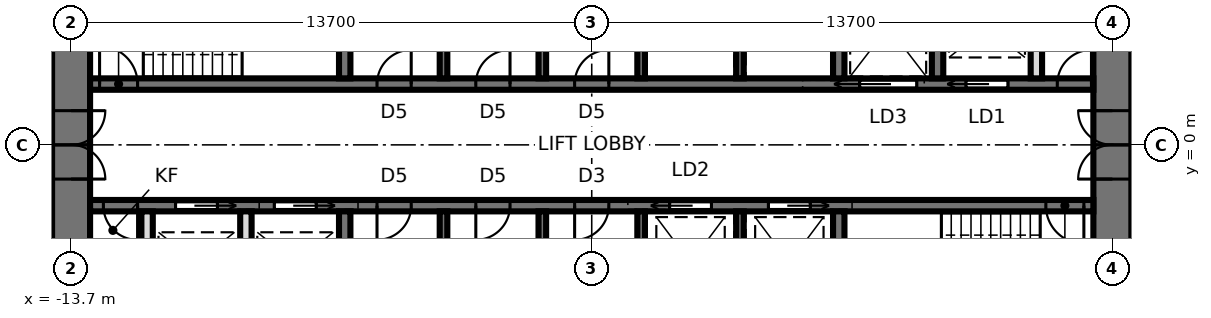
"""IFC4 building model, lengths in metres.
Left out: names, types, materials, properties, quantities, classifications, styles, units other than length and angle.
Written with IfcOpenShell. Run it as: python <this file> out.ifc"""

import sys

from ifc_helpers import new_model, si_unit, direction, frame, frame_2d, origin, place, context, subcontext, project, spatial, rectangle, extrude, element, fill, save


model = new_model("IFC4")
c1 = context("Model", 3, precision=1e-05, world=origin(), true_north=direction((0.0, 1.0)))
c2 = subcontext(c1, "Body", "Model", "MODEL_VIEW")
j1 = project(units=[si_unit("LENGTHUNIT", "METRE"), si_unit("PLANEANGLEUNIT", "RADIAN")], contexts=[c1])
p1 = place(None, origin())
s1 = spatial("IfcSite", under=j1, at=p1, CompositionType="ELEMENT")
p2 = place(p1, origin())
s2 = spatial("IfcBuilding", under=s1, at=p2, CompositionType="ELEMENT")
p3 = place(p2, frame((0.0, 0.0, 234.5)))
s3 = spatial("IfcBuildingStorey", under=s2, at=p3, CompositionType="ELEMENT", Elevation=234.5)
p4 = place(p3, frame((13.7, -9.5, 0.0), z_axis=(0.0, 0.0, 1.0), x_axis=(0.0, 1.0, 0.0)))
e1 = element("IfcWall", 1, at=p4, inside=s3, PredefinedType="SHEAR", context=c2, shape_type="SweptSolid", body=[
    extrude(rectangle(XDim=19.0, YDim=1.0, at=frame_2d((9.5, 0.0))), origin(), (0.0, 0.0, 1.0), 3.9),
])
p5 = place(p4, frame((8.6, 0.0, 0.0)))
e2 = element("IfcOpeningElement", 2, at=p5, cuts=e1, PredefinedType="OPENING", context=c2, shape_type="SweptSolid", body=[
    extrude(rectangle(XDim=1.8, YDim=2.4, at=frame_2d((0.9, 1.2))), frame((0.0, 0.51, 0.0), z_axis=(0.0, -1.0, 0.0), x_axis=(1.0, 0.0, 0.0)), (0.0, 0.0, 1.0), 1.02),
])
p6 = place(p3, frame((-13.7, 9.5, 0.0), z_axis=(0.0, 0.0, 1.0), x_axis=(0.0, -1.0, 0.0)))
e3 = element("IfcWall", 3, at=p6, inside=s3, PredefinedType="SHEAR", context=c2, shape_type="SweptSolid", body=[
    extrude(rectangle(XDim=19.0, YDim=1.0, at=frame_2d((9.5, 0.0))), origin(), (0.0, 0.0, 1.0), 3.9),
])
p7 = place(p6, frame((8.6, 0.0, 0.0)))
e4 = element("IfcOpeningElement", 4, at=p7, cuts=e3, PredefinedType="OPENING", context=c2, shape_type="SweptSolid", body=[
    extrude(rectangle(XDim=1.8, YDim=2.4, at=frame_2d((0.9, 1.2))), frame((0.0, 0.51, 0.0), z_axis=(0.0, -1.0, 0.0), x_axis=(1.0, 0.0, 0.0)), (0.0, 0.0, 1.0), 1.02),
])
p8 = place(p3, frame((-13.2, 1.6, 0.0), z_axis=(0.0, 0.0, 1.0), x_axis=(1.0, 0.0, 0.0)))
e5 = element("IfcWall", 5, at=p8, inside=s3, PredefinedType="SHEAR", context=c2, shape_type="SweptSolid", body=[
    extrude(rectangle(XDim=26.4, YDim=0.3, at=frame_2d((13.2, 0.0))), origin(), (0.0, 0.0, 1.0), 3.9),
])
p9 = place(p8, frame((0.25, 0.0, 0.0)))
e6 = element("IfcOpeningElement", 6, at=p9, cuts=e5, PredefinedType="OPENING", context=c2, shape_type="SweptSolid", body=[
    extrude(rectangle(XDim=1.0, YDim=2.1, at=frame_2d((0.5, 1.05))), frame((0.0, 0.16, 0.0), z_axis=(0.0, -1.0, 0.0), x_axis=(1.0, 0.0, 0.0)), (0.0, 0.0, 1.0), 0.32),
])
p10 = place(p8, frame((23.05, 0.0, 0.0)))
e7 = element("IfcOpeningElement", 7, at=p10, cuts=e5, PredefinedType="OPENING", context=c2, shape_type="SweptSolid", body=[
    extrude(rectangle(XDim=1.1, YDim=2.3, at=frame_2d((0.55, 1.15))), frame((0.0, 0.16, 0.0), z_axis=(0.0, -1.0, 0.0), x_axis=(1.0, 0.0, 0.0)), (0.0, 0.0, 1.0), 0.32),
])
p11 = place(p8, frame((20.25, 0.0, 0.0)))
e8 = element("IfcOpeningElement", 8, at=p11, cuts=e5, PredefinedType="OPENING", context=c2, shape_type="SweptSolid", body=[
    extrude(rectangle(XDim=1.5, YDim=2.4, at=frame_2d((0.75, 1.2))), frame((0.0, 0.16, 0.0), z_axis=(0.0, -1.0, 0.0), x_axis=(1.0, 0.0, 0.0)), (0.0, 0.0, 1.0), 0.32),
])
p12 = place(p8, frame((7.55, 0.0, 0.0)))
e9 = element("IfcOpeningElement", 9, at=p12, cuts=e5, PredefinedType="OPENING", context=c2, shape_type="SweptSolid", body=[
    extrude(rectangle(XDim=0.9, YDim=2.1, at=frame_2d((0.45, 1.05))), frame((0.0, 0.16, 0.0), z_axis=(0.0, -1.0, 0.0), x_axis=(1.0, 0.0, 0.0)), (0.0, 0.0, 1.0), 0.32),
])
p13 = place(p8, frame((10.15, 0.0, 0.0)))
e10 = element("IfcOpeningElement", 10, at=p13, cuts=e5, PredefinedType="OPENING", context=c2, shape_type="SweptSolid", body=[
    extrude(rectangle(XDim=0.9, YDim=2.1, at=frame_2d((0.45, 1.05))), frame((0.0, 0.16, 0.0), z_axis=(0.0, -1.0, 0.0), x_axis=(1.0, 0.0, 0.0)), (0.0, 0.0, 1.0), 0.32),
])
p14 = place(p8, frame((12.75, 0.0, 0.0)))
e11 = element("IfcOpeningElement", 11, at=p14, cuts=e5, PredefinedType="OPENING", context=c2, shape_type="SweptSolid", body=[
    extrude(rectangle(XDim=0.9, YDim=2.1, at=frame_2d((0.45, 1.05))), frame((0.0, 0.16, 0.0), z_axis=(0.0, -1.0, 0.0), x_axis=(1.0, 0.0, 0.0)), (0.0, 0.0, 1.0), 0.32),
])
p15 = place(p8, frame((25.45, 0.0, 0.0)))
e12 = element("IfcOpeningElement", 12, at=p15, cuts=e5, PredefinedType="OPENING", context=c2, shape_type="SweptSolid", body=[
    extrude(rectangle(XDim=0.9, YDim=2.1, at=frame_2d((0.45, 1.05))), frame((0.0, 0.16, 0.0), z_axis=(0.0, -1.0, 0.0), x_axis=(1.0, 0.0, 0.0)), (0.0, 0.0, 1.0), 0.32),
])
p16 = place(p3, frame((-13.2, -1.6, 0.0), z_axis=(0.0, 0.0, 1.0), x_axis=(1.0, 0.0, 0.0)))
e13 = element("IfcWall", 13, at=p16, inside=s3, PredefinedType="SHEAR", context=c2, shape_type="SweptSolid", body=[
    extrude(rectangle(XDim=26.4, YDim=0.3, at=frame_2d((13.2, 0.0))), origin(), (0.0, 0.0, 1.0), 3.9),
])
p17 = place(p16, frame((25.15, 0.0, 0.0)))
e14 = element("IfcOpeningElement", 14, at=p17, cuts=e13, PredefinedType="OPENING", context=c2, shape_type="SweptSolid", body=[
    extrude(rectangle(XDim=1.0, YDim=2.1, at=frame_2d((0.5, 1.05))), frame((0.0, 0.16, 0.0), z_axis=(0.0, -1.0, 0.0), x_axis=(1.0, 0.0, 0.0)), (0.0, 0.0, 1.0), 0.32),
])
p18 = place(p16, frame((7.55, 0.0, 0.0)))
e15 = element("IfcOpeningElement", 15, at=p18, cuts=e13, PredefinedType="OPENING", context=c2, shape_type="SweptSolid", body=[
    extrude(rectangle(XDim=0.9, YDim=2.1, at=frame_2d((0.45, 1.05))), frame((0.0, 0.16, 0.0), z_axis=(0.0, -1.0, 0.0), x_axis=(1.0, 0.0, 0.0)), (0.0, 0.0, 1.0), 0.32),
])
p19 = place(p16, frame((10.15, 0.0, 0.0)))
e16 = element("IfcOpeningElement", 16, at=p19, cuts=e13, PredefinedType="OPENING", context=c2, shape_type="SweptSolid", body=[
    extrude(rectangle(XDim=0.9, YDim=2.1, at=frame_2d((0.45, 1.05))), frame((0.0, 0.16, 0.0), z_axis=(0.0, -1.0, 0.0), x_axis=(1.0, 0.0, 0.0)), (0.0, 0.0, 1.0), 0.32),
])
p20 = place(p16, frame((12.75, 0.0, 0.0)))
e17 = element("IfcOpeningElement", 17, at=p20, cuts=e13, PredefinedType="OPENING", context=c2, shape_type="SweptSolid", body=[
    extrude(rectangle(XDim=0.9, YDim=2.1, at=frame_2d((0.45, 1.05))), frame((0.0, 0.16, 0.0), z_axis=(0.0, -1.0, 0.0), x_axis=(1.0, 0.0, 0.0)), (0.0, 0.0, 1.0), 0.32),
])
p21 = place(p16, frame((15.25, 0.0, 0.0)))
e18 = element("IfcOpeningElement", 18, at=p21, cuts=e13, PredefinedType="OPENING", context=c2, shape_type="SweptSolid", body=[
    extrude(rectangle(XDim=1.1, YDim=2.3, at=frame_2d((0.55, 1.15))), frame((0.0, 0.16, 0.0), z_axis=(0.0, -1.0, 0.0), x_axis=(1.0, 0.0, 0.0)), (0.0, 0.0, 1.0), 0.32),
])
p22 = place(p16, frame((17.85, 0.0, 0.0)))
e19 = element("IfcOpeningElement", 19, at=p22, cuts=e13, PredefinedType="OPENING", context=c2, shape_type="SweptSolid", body=[
    extrude(rectangle(XDim=1.1, YDim=2.3, at=frame_2d((0.55, 1.15))), frame((0.0, 0.16, 0.0), z_axis=(0.0, -1.0, 0.0), x_axis=(1.0, 0.0, 0.0)), (0.0, 0.0, 1.0), 0.32),
])
p23 = place(p16, frame((4.85, 0.0, 0.0)))
e20 = element("IfcOpeningElement", 20, at=p23, cuts=e13, PredefinedType="OPENING", context=c2, shape_type="SweptSolid", body=[
    extrude(rectangle(XDim=1.1, YDim=2.3, at=frame_2d((0.55, 1.15))), frame((0.0, 0.16, 0.0), z_axis=(0.0, -1.0, 0.0), x_axis=(1.0, 0.0, 0.0)), (0.0, 0.0, 1.0), 0.32),
])
p24 = place(p16, frame((2.25, 0.0, 0.0)))
e21 = element("IfcOpeningElement", 21, at=p24, cuts=e13, PredefinedType="OPENING", context=c2, shape_type="SweptSolid", body=[
    extrude(rectangle(XDim=1.1, YDim=2.3, at=frame_2d((0.55, 1.15))), frame((0.0, 0.16, 0.0), z_axis=(0.0, -1.0, 0.0), x_axis=(1.0, 0.0, 0.0)), (0.0, 0.0, 1.0), 0.32),
])
p25 = place(p16, frame((0.35, 0.0, 0.0)))
e22 = element("IfcOpeningElement", 22, at=p25, cuts=e13, PredefinedType="OPENING", context=c2, shape_type="SweptSolid", body=[
    extrude(rectangle(XDim=0.9, YDim=2.1, at=frame_2d((0.45, 1.05))), frame((0.0, 0.16, 0.0), z_axis=(0.0, -1.0, 0.0), x_axis=(1.0, 0.0, 0.0)), (0.0, 0.0, 1.0), 0.32),
])
for number, where, z_axis, x_axis in (
    (23, (-6.5, 1.75, 0.0), (0.0, 0.0, 1.0), (0.0, 1.0, 0.0)),
    (24, (6.5, 1.75, 0.0), (0.0, 0.0, 1.0), (0.0, 1.0, 0.0)),
):
    element("IfcWall", number, at=place(p3, frame(where, z_axis=z_axis, x_axis=x_axis)), inside=s3, PredefinedType="SHEAR", context=c2, shape_type="SweptSolid", body=[
        extrude(rectangle(XDim=2.7, YDim=0.3, at=frame_2d((1.35, 0.0))), origin(), (0.0, 0.0, 1.0), 3.9),
    ])
for number, where, z_axis, x_axis in (
    (25, (-3.9, 1.75, 0.0), (0.0, 0.0, 1.0), (0.0, 1.0, 0.0)),
    (26, (-1.3, 1.75, 0.0), (0.0, 0.0, 1.0), (0.0, 1.0, 0.0)),
    (27, (1.3, 1.75, 0.0), (0.0, 0.0, 1.0), (0.0, 1.0, 0.0)),
    (28, (3.9, 1.75, 0.0), (0.0, 0.0, 1.0), (0.0, 1.0, 0.0)),
):
    element("IfcWall", number, at=place(p3, frame(where, z_axis=z_axis, x_axis=x_axis)), inside=s3, PredefinedType="SHEAR", context=c2, shape_type="SweptSolid", body=[
        extrude(rectangle(XDim=2.7, YDim=0.2, at=frame_2d((1.35, 0.0))), origin(), (0.0, 0.0, 1.0), 3.9),
    ])
for number, where, z_axis, x_axis in (
    (29, (-6.5, -1.75, 0.0), (0.0, 0.0, 1.0), (0.0, -1.0, 0.0)),
    (30, (6.5, -1.75, 0.0), (0.0, 0.0, 1.0), (0.0, -1.0, 0.0)),
):
    element("IfcWall", number, at=place(p3, frame(where, z_axis=z_axis, x_axis=x_axis)), inside=s3, PredefinedType="SHEAR", context=c2, shape_type="SweptSolid", body=[
        extrude(rectangle(XDim=2.7, YDim=0.3, at=frame_2d((1.35, 0.0))), origin(), (0.0, 0.0, 1.0), 3.9),
    ])
for number, where, z_axis, x_axis in (
    (31, (-3.9, -1.75, 0.0), (0.0, 0.0, 1.0), (0.0, -1.0, 0.0)),
    (32, (-1.3, -1.75, 0.0), (0.0, 0.0, 1.0), (0.0, -1.0, 0.0)),
    (33, (1.3, -1.75, 0.0), (0.0, 0.0, 1.0), (0.0, -1.0, 0.0)),
    (34, (3.9, -1.75, 0.0), (0.0, 0.0, 1.0), (0.0, -1.0, 0.0)),
):
    element("IfcWall", number, at=place(p3, frame(where, z_axis=z_axis, x_axis=x_axis)), inside=s3, PredefinedType="SHEAR", context=c2, shape_type="SweptSolid", body=[
        extrude(rectangle(XDim=2.7, YDim=0.2, at=frame_2d((1.35, 0.0))), origin(), (0.0, 0.0, 1.0), 3.9),
    ])
p26 = place(p3, frame((9.1, 1.75, 0.0), z_axis=(0.0, 0.0, 1.0), x_axis=(0.0, 1.0, 0.0)))
e35 = element("IfcWall", 35, at=p26, inside=s3, PredefinedType="SHEAR", context=c2, shape_type="SweptSolid", body=[
    extrude(rectangle(XDim=2.7, YDim=0.3, at=frame_2d((1.35, 0.0))), origin(), (0.0, 0.0, 1.0), 3.9),
])
for number, where, z_axis, x_axis in (
    (36, (-9.1, -1.75, 0.0), (0.0, 0.0, 1.0), (0.0, -1.0, 0.0)),
    (37, (-11.7, -1.75, 0.0), (0.0, 0.0, 1.0), (0.0, -1.0, 0.0)),
    (38, (11.7, 1.75, 0.0), (0.0, 0.0, 1.0), (0.0, 1.0, 0.0)),
):
    element("IfcWall", number, at=place(p3, frame(where, z_axis=z_axis, x_axis=x_axis)), inside=s3, PredefinedType="SOLIDWALL", context=c2, shape_type="SweptSolid", body=[
        extrude(rectangle(XDim=2.7, YDim=0.3, at=frame_2d((1.35, 0.0))), origin(), (0.0, 0.0, 1.0), 3.74),
    ])
p27 = place(p7, origin())
e39 = element("IfcDoor", 39, at=p27, inside=s3, OperationType="DOUBLE_DOOR_SINGLE_SWING", PredefinedType="DOOR", context=c2, shape_type="SweptSolid", body=[
    extrude(rectangle(XDim=1.72, YDim=2.36, at=frame_2d((0.9, 1.18))), frame((0.0, 0.025, 0.0), z_axis=(0.0, -1.0, 0.0), x_axis=(1.0, 0.0, 0.0)), (0.0, 0.0, 1.0), 0.05),
    extrude(rectangle(XDim=0.04, YDim=2.4, at=frame_2d((0.02, 1.2))), frame((0.0, 0.25, 0.0), z_axis=(0.0, -1.0, 0.0), x_axis=(1.0, 0.0, 0.0)), (0.0, 0.0, 1.0), 0.5),
    extrude(rectangle(XDim=0.04, YDim=2.4, at=frame_2d((1.78, 1.2))), frame((0.0, 0.25, 0.0), z_axis=(0.0, -1.0, 0.0), x_axis=(1.0, 0.0, 0.0)), (0.0, 0.0, 1.0), 0.5),
    extrude(rectangle(XDim=1.72, YDim=0.04, at=frame_2d((0.9, 2.38))), frame((0.0, 0.25, 0.0), z_axis=(0.0, -1.0, 0.0), x_axis=(1.0, 0.0, 0.0)), (0.0, 0.0, 1.0), 0.5),
])
fill(e4, e39)
p28 = place(p5, origin())
e40 = element("IfcDoor", 40, at=p28, inside=s3, OperationType="DOUBLE_DOOR_SINGLE_SWING", PredefinedType="DOOR", context=c2, shape_type="SweptSolid", body=[
    extrude(rectangle(XDim=1.72, YDim=2.36, at=frame_2d((0.9, 1.18))), frame((0.0, 0.025, 0.0), z_axis=(0.0, -1.0, 0.0), x_axis=(1.0, 0.0, 0.0)), (0.0, 0.0, 1.0), 0.05),
    extrude(rectangle(XDim=0.04, YDim=2.4, at=frame_2d((0.02, 1.2))), frame((0.0, 0.25, 0.0), z_axis=(0.0, -1.0, 0.0), x_axis=(1.0, 0.0, 0.0)), (0.0, 0.0, 1.0), 0.5),
    extrude(rectangle(XDim=0.04, YDim=2.4, at=frame_2d((1.78, 1.2))), frame((0.0, 0.25, 0.0), z_axis=(0.0, -1.0, 0.0), x_axis=(1.0, 0.0, 0.0)), (0.0, 0.0, 1.0), 0.5),
    extrude(rectangle(XDim=1.72, YDim=0.04, at=frame_2d((0.9, 2.38))), frame((0.0, 0.25, 0.0), z_axis=(0.0, -1.0, 0.0), x_axis=(1.0, 0.0, 0.0)), (0.0, 0.0, 1.0), 0.5),
])
fill(e2, e40)
p29 = place(p9, origin())
e41 = element("IfcDoor", 41, at=p29, inside=s3, OperationType="SINGLE_SWING_LEFT", PredefinedType="DOOR", context=c2, shape_type="SweptSolid", body=[
    extrude(rectangle(XDim=1.0, YDim=2.1, at=frame_2d((0.5, 1.05))), frame((0.0, 0.025, 0.0), z_axis=(0.0, -1.0, 0.0), x_axis=(1.0, 0.0, 0.0)), (0.0, 0.0, 1.0), 0.05),
])
fill(e6, e41)
p30 = place(p17, frame((1.0, 0.0, 0.0), z_axis=(0.0, 0.0, 1.0), x_axis=(-1.0, 0.0, 0.0)))
e42 = element("IfcDoor", 42, at=p30, inside=s3, OperationType="SINGLE_SWING_LEFT", PredefinedType="DOOR", context=c2, shape_type="SweptSolid", body=[
    extrude(rectangle(XDim=1.0, YDim=2.1, at=frame_2d((0.5, 1.05))), frame((0.0, 0.025, 0.0), z_axis=(0.0, -1.0, 0.0), x_axis=(1.0, 0.0, 0.0)), (0.0, 0.0, 1.0), 0.05),
])
fill(e14, e42)
p31 = place(p10, origin())
e43 = element("IfcDoor", 43, at=p31, inside=s3, OperationType="SLIDING_TO_LEFT", PredefinedType="DOOR", context=c2, shape_type="SweptSolid", body=[
    extrude(rectangle(XDim=1.1, YDim=2.3, at=frame_2d((0.55, 1.15))), frame((0.0, 0.025, 0.0), z_axis=(0.0, -1.0, 0.0), x_axis=(1.0, 0.0, 0.0)), (0.0, 0.0, 1.0), 0.05),
])
fill(e7, e43)
p32 = place(p11, origin())
e44 = element("IfcDoor", 44, at=p32, inside=s3, OperationType="SLIDING_TO_LEFT", PredefinedType="DOOR", context=c2, shape_type="SweptSolid", body=[
    extrude(rectangle(XDim=1.5, YDim=2.4, at=frame_2d((0.75, 1.2))), frame((0.0, 0.025, 0.0), z_axis=(0.0, -1.0, 0.0), x_axis=(1.0, 0.0, 0.0)), (0.0, 0.0, 1.0), 0.05),
])
fill(e8, e44)
p33 = place(p12, origin())
e45 = element("IfcDoor", 45, at=p33, inside=s3, OperationType="SINGLE_SWING_RIGHT", PredefinedType="DOOR", context=c2, shape_type="SweptSolid", body=[
    extrude(rectangle(XDim=0.9, YDim=2.1, at=frame_2d((0.45, 1.05))), frame((0.0, 0.025, 0.0), z_axis=(0.0, -1.0, 0.0), x_axis=(1.0, 0.0, 0.0)), (0.0, 0.0, 1.0), 0.05),
])
fill(e9, e45)
p34 = place(p13, origin())
e46 = element("IfcDoor", 46, at=p34, inside=s3, OperationType="SINGLE_SWING_RIGHT", PredefinedType="DOOR", context=c2, shape_type="SweptSolid", body=[
    extrude(rectangle(XDim=0.9, YDim=2.1, at=frame_2d((0.45, 1.05))), frame((0.0, 0.025, 0.0), z_axis=(0.0, -1.0, 0.0), x_axis=(1.0, 0.0, 0.0)), (0.0, 0.0, 1.0), 0.05),
])
fill(e10, e46)
p35 = place(p14, origin())
e47 = element("IfcDoor", 47, at=p35, inside=s3, OperationType="SINGLE_SWING_RIGHT", PredefinedType="DOOR", context=c2, shape_type="SweptSolid", body=[
    extrude(rectangle(XDim=0.9, YDim=2.1, at=frame_2d((0.45, 1.05))), frame((0.0, 0.025, 0.0), z_axis=(0.0, -1.0, 0.0), x_axis=(1.0, 0.0, 0.0)), (0.0, 0.0, 1.0), 0.05),
])
fill(e11, e47)
p36 = place(p18, frame((0.9, 0.0, 0.0), z_axis=(0.0, 0.0, 1.0), x_axis=(-1.0, 0.0, 0.0)))
e48 = element("IfcDoor", 48, at=p36, inside=s3, OperationType="SINGLE_SWING_RIGHT", PredefinedType="DOOR", context=c2, shape_type="SweptSolid", body=[
    extrude(rectangle(XDim=0.9, YDim=2.1, at=frame_2d((0.45, 1.05))), frame((0.0, 0.025, 0.0), z_axis=(0.0, -1.0, 0.0), x_axis=(1.0, 0.0, 0.0)), (0.0, 0.0, 1.0), 0.05),
])
fill(e15, e48)
p37 = place(p19, frame((0.9, 0.0, 0.0), z_axis=(0.0, 0.0, 1.0), x_axis=(-1.0, 0.0, 0.0)))
e49 = element("IfcDoor", 49, at=p37, inside=s3, OperationType="SINGLE_SWING_RIGHT", PredefinedType="DOOR", context=c2, shape_type="SweptSolid", body=[
    extrude(rectangle(XDim=0.9, YDim=2.1, at=frame_2d((0.45, 1.05))), frame((0.0, 0.025, 0.0), z_axis=(0.0, -1.0, 0.0), x_axis=(1.0, 0.0, 0.0)), (0.0, 0.0, 1.0), 0.05),
])
fill(e16, e49)
p38 = place(p20, frame((0.9, 0.0, 0.0), z_axis=(0.0, 0.0, 1.0), x_axis=(-1.0, 0.0, 0.0)))
e50 = element("IfcDoor", 50, at=p38, inside=s3, OperationType="SINGLE_SWING_RIGHT", PredefinedType="DOOR", context=c2, shape_type="SweptSolid", body=[
    extrude(rectangle(XDim=0.9, YDim=2.1, at=frame_2d((0.45, 1.05))), frame((0.0, 0.025, 0.0), z_axis=(0.0, -1.0, 0.0), x_axis=(1.0, 0.0, 0.0)), (0.0, 0.0, 1.0), 0.05),
])
fill(e17, e50)
p39 = place(p21, frame((1.1, 0.0, 0.0), z_axis=(0.0, 0.0, 1.0), x_axis=(-1.0, 0.0, 0.0)))
e51 = element("IfcDoor", 51, at=p39, inside=s3, OperationType="SLIDING_TO_RIGHT", PredefinedType="DOOR", context=c2, shape_type="SweptSolid", body=[
    extrude(rectangle(XDim=1.1, YDim=2.3, at=frame_2d((0.55, 1.15))), frame((0.0, 0.025, 0.0), z_axis=(0.0, -1.0, 0.0), x_axis=(1.0, 0.0, 0.0)), (0.0, 0.0, 1.0), 0.05),
])
fill(e18, e51)
p40 = place(p22, frame((1.1, 0.0, 0.0), z_axis=(0.0, 0.0, 1.0), x_axis=(-1.0, 0.0, 0.0)))
e52 = element("IfcDoor", 52, at=p40, inside=s3, OperationType="SLIDING_TO_LEFT", PredefinedType="DOOR", context=c2, shape_type="SweptSolid", body=[
    extrude(rectangle(XDim=1.1, YDim=2.3, at=frame_2d((0.55, 1.15))), frame((0.0, 0.025, 0.0), z_axis=(0.0, -1.0, 0.0), x_axis=(1.0, 0.0, 0.0)), (0.0, 0.0, 1.0), 0.05),
])
fill(e19, e52)
p41 = place(p23, frame((1.1, 0.0, 0.0), z_axis=(0.0, 0.0, 1.0), x_axis=(-1.0, 0.0, 0.0)))
e53 = element("IfcDoor", 53, at=p41, inside=s3, OperationType="SLIDING_TO_LEFT", PredefinedType="DOOR", context=c2, shape_type="SweptSolid", body=[
    extrude(rectangle(XDim=1.1, YDim=2.3, at=frame_2d((0.55, 1.15))), frame((0.0, 0.025, 0.0), z_axis=(0.0, -1.0, 0.0), x_axis=(1.0, 0.0, 0.0)), (0.0, 0.0, 1.0), 0.05),
])
fill(e20, e53)
p42 = place(p24, frame((1.1, 0.0, 0.0), z_axis=(0.0, 0.0, 1.0), x_axis=(-1.0, 0.0, 0.0)))
e54 = element("IfcDoor", 54, at=p42, inside=s3, OperationType="SLIDING_TO_LEFT", PredefinedType="DOOR", context=c2, shape_type="SweptSolid", body=[
    extrude(rectangle(XDim=1.1, YDim=2.3, at=frame_2d((0.55, 1.15))), frame((0.0, 0.025, 0.0), z_axis=(0.0, -1.0, 0.0), x_axis=(1.0, 0.0, 0.0)), (0.0, 0.0, 1.0), 0.05),
])
fill(e21, e54)
p43 = place(p15, origin())
e55 = element("IfcDoor", 55, at=p43, inside=s3, OperationType="SINGLE_SWING_RIGHT", PredefinedType="DOOR", context=c2, shape_type="SweptSolid", body=[
    extrude(rectangle(XDim=0.9, YDim=2.1, at=frame_2d((0.45, 1.05))), frame((0.0, 0.025, 0.0), z_axis=(0.0, -1.0, 0.0), x_axis=(1.0, 0.0, 0.0)), (0.0, 0.0, 1.0), 0.05),
])
fill(e12, e55)
p44 = place(p25, frame((0.9, 0.0, 0.0), z_axis=(0.0, 0.0, 1.0), x_axis=(-1.0, 0.0, 0.0)))
e56 = element("IfcDoor", 56, at=p44, inside=s3, OperationType="SINGLE_SWING_LEFT", PredefinedType="DOOR", context=c2, shape_type="SweptSolid", body=[
    extrude(rectangle(XDim=0.9, YDim=2.1, at=frame_2d((0.45, 1.05))), frame((0.0, 0.025, 0.0), z_axis=(0.0, -1.0, 0.0), x_axis=(1.0, 0.0, 0.0)), (0.0, 0.0, 1.0), 0.05),
])
fill(e22, e56)
save(model, sys.argv[1])
